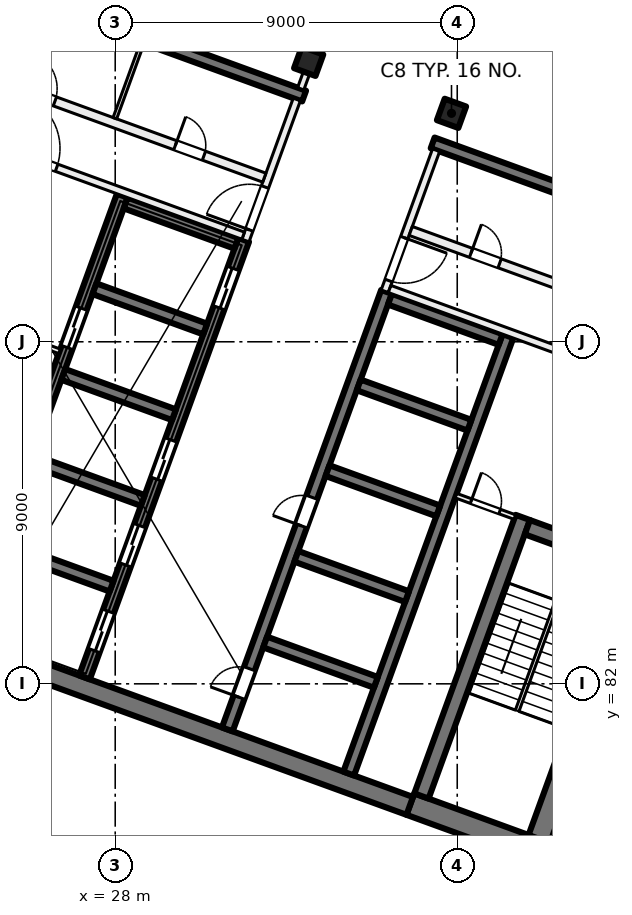
"""IFC4 building model, lengths in metres.
Left out: names, types, materials, properties, quantities, classifications, styles, units other than length and angle.
Written with IfcOpenShell. Run it as: python <this file> out.ifc"""

import sys

from ifc_helpers import new_model, si_unit, direction, frame, frame_2d, origin, origin_2d, place, context, subcontext, project, spatial, rectangle, extrude, element, fill, save


model = new_model("IFC4")
c1 = context("Model", 3, precision=1e-05, world=origin(), true_north=direction((0.0, 1.0)))
c2 = subcontext(c1, "Body", "Model", "MODEL_VIEW")
j1 = project(units=[si_unit("LENGTHUNIT", "METRE"), si_unit("PLANEANGLEUNIT", "RADIAN")], contexts=[c1])
p1 = place(None, origin())
s1 = spatial("IfcSite", under=j1, at=p1, CompositionType="ELEMENT")
p2 = place(p1, origin())
s2 = spatial("IfcBuilding", under=s1, at=p2, CompositionType="ELEMENT")
p3 = place(p2, frame((0.0, 0.0, 204.0)))
s3 = spatial("IfcBuildingStorey", under=s2, at=p3, CompositionType="ELEMENT", Elevation=204.0)
for number, where, z_axis, x_axis in (
    (1, (36.849, 97.011, 0.0), (0.0, 0.0, 1.0), (-0.342, -0.94, 0.0)),
    (2, (33.091, 98.379, 0.0), (0.0, 0.0, 1.0), (-0.342, -0.94, 0.0)),
):
    element("IfcColumn", number, at=place(p3, frame(where, z_axis=z_axis, x_axis=x_axis)), inside=s3, PredefinedType="COLUMN", context=c2, shape_type="SweptSolid", body=[
        extrude(rectangle(XDim=0.6, YDim=0.6, at=origin_2d()), origin(), (0.0, 0.0, 1.0), 4.0),
    ])
p4 = place(p3, frame((39.338, 77.535, 0.0), z_axis=(0.0, 0.0, 1.0), x_axis=(-0.939701471648, 0.341995824804, 0.0)))
e3 = element("IfcWall", 3, at=p4, inside=s3, PredefinedType="SHEAR", context=c2, shape_type="SweptSolid", body=[
    extrude(rectangle(XDim=3.8, YDim=0.6, at=frame_2d((1.9, 0.0))), origin(), (0.0, 0.0, 1.0), 4.0),
])
p5 = place(p3, frame((35.75, 78.788, 0.0), z_axis=(0.0, 0.0, 1.0), x_axis=(-0.939692894512, 0.342019391267, 0.0)))
e4 = element("IfcWall", 4, at=p5, inside=s3, PredefinedType="SHEAR", context=c2, shape_type="SweptSolid", body=[
    extrude(rectangle(XDim=14.4, YDim=0.5, at=frame_2d((7.2, 0.0))), origin(), (0.0, 0.0, 1.0), 4.0),
])
p6 = place(p3, frame((39.159, 77.92, 0.0), z_axis=(0.0, 0.0, 1.0), x_axis=(0.342016982193, 0.939693771338, 0.0)))
e5 = element("IfcWall", 5, at=p6, inside=s3, PredefinedType="SHEAR", context=c2, shape_type="SweptSolid", body=[
    extrude(rectangle(XDim=7.8, YDim=0.6, at=frame_2d((3.9, 0.0))), origin(), (0.0, 0.0, 1.0), 4.0),
])
p7 = place(p3, frame((36.058, 79.048, 0.0), z_axis=(0.0, 0.0, 1.0), x_axis=(0.342016982193, 0.939693771338, 0.0)))
e6 = element("IfcWall", 6, at=p7, inside=s3, PredefinedType="SHEAR", context=c2, shape_type="SweptSolid", body=[
    extrude(rectangle(XDim=7.8, YDim=0.4, at=frame_2d((3.9, 0.0))), origin(), (0.0, 0.0, 1.0), 4.0),
])
p8 = place(p3, frame((41.476, 85.164, 0.0), z_axis=(0.0, 0.0, 1.0), x_axis=(-0.939678810556, 0.342058084236, 0.0)))
e7 = element("IfcWall", 7, at=p8, inside=s3, PredefinedType="SHEAR", context=c2, shape_type="SweptSolid", body=[
    extrude(rectangle(XDim=2.8, YDim=0.4, at=frame_2d((1.4, 0.0))), origin(), (0.0, 0.0, 1.0), 4.0),
])
p9 = place(p8, frame((0.85, 0.0, 0.0)))
e8 = element("IfcOpeningElement", 8, at=p9, cuts=e7, PredefinedType="OPENING", context=c2, shape_type="SweptSolid", body=[
    extrude(rectangle(XDim=1.0, YDim=2.1, at=frame_2d((0.5, 1.05))), frame((0.0, 0.21, 0.0), z_axis=(0.0, -1.0, 0.0), x_axis=(1.0, 0.0, 0.0)), (0.0, 0.0, 1.0), 0.42),
])
p10 = place(p3, frame((30.949, 80.801, 0.0), z_axis=(0.0, 0.0, 1.0), x_axis=(0.342016684409, 0.939693879721, 0.0)))
e9 = element("IfcWall", 9, at=p10, inside=s3, PredefinedType="SHEAR", context=c2, shape_type="SweptSolid", body=[
    extrude(rectangle(XDim=12.25, YDim=0.3, at=frame_2d((6.125, 0.0))), origin(), (0.0, 0.0, 1.0), 4.0),
])
p11 = place(p10, frame((0.9, 0.0, 0.0)))
e10 = element("IfcOpeningElement", 10, at=p11, cuts=e9, PredefinedType="OPENING", context=c2, shape_type="SweptSolid", body=[
    extrude(rectangle(XDim=0.8, YDim=2.1, at=frame_2d((0.4, 1.05))), frame((0.0, 0.16, 0.0), z_axis=(0.0, -1.0, 0.0), x_axis=(1.0, 0.0, 0.0)), (0.0, 0.0, 1.0), 0.32),
])
p12 = place(p10, frame((5.7, 0.0, 0.0)))
e11 = element("IfcOpeningElement", 11, at=p12, cuts=e9, PredefinedType="OPENING", context=c2, shape_type="SweptSolid", body=[
    extrude(rectangle(XDim=0.8, YDim=2.1, at=frame_2d((0.4, 1.05))), frame((0.0, 0.16, 0.0), z_axis=(0.0, -1.0, 0.0), x_axis=(1.0, 0.0, 0.0)), (0.0, 0.0, 1.0), 0.32),
])
p13 = place(p3, frame((34.144, 79.638, 0.0), z_axis=(0.0, 0.0, 1.0), x_axis=(0.342016684409, 0.939693879721, 0.0)))
e12 = element("IfcWall", 12, at=p13, inside=s3, PredefinedType="SHEAR", context=c2, shape_type="SweptSolid", body=[
    extrude(rectangle(XDim=12.25, YDim=0.3, at=frame_2d((6.125, 0.0))), origin(), (0.0, 0.0, 1.0), 4.0),
])
p14 = place(p3, frame((34.858, 82.039, 0.0), z_axis=(0.0, 0.0, 1.0), x_axis=(-0.939689908313, 0.342027595692, 0.0)))
e13 = element("IfcWall", 13, at=p14, inside=s3, PredefinedType="SHEAR", context=c2, shape_type="SweptSolid", body=[
    extrude(rectangle(XDim=3.1, YDim=0.3, at=frame_2d((1.55, 0.0))), origin(), (0.0, 0.0, 1.0), 4.0),
])
p15 = place(p3, frame((35.679, 84.294, 0.0), z_axis=(0.0, 0.0, 1.0), x_axis=(-0.939706007505, 0.341983361377, 0.0)))
e14 = element("IfcWall", 14, at=p15, inside=s3, PredefinedType="SHEAR", context=c2, shape_type="SweptSolid", body=[
    extrude(rectangle(XDim=3.1, YDim=0.3, at=frame_2d((1.55, 0.0))), origin(), (0.0, 0.0, 1.0), 4.0),
])
for number, where, z_axis, x_axis in (
    (15, (36.5, 86.549, 0.0), (0.0, 0.0, 1.0), (-0.94, 0.342, 0.0)),
    (16, (37.321, 88.805, 0.0), (0.0, 0.0, 1.0), (-0.94, 0.342, 0.0)),
    (17, (38.142, 91.06, 0.0), (0.0, 0.0, 1.0), (-0.94, 0.342, 0.0)),
):
    element("IfcWall", number, at=place(p3, frame(where, z_axis=z_axis, x_axis=x_axis)), inside=s3, PredefinedType="SHEAR", context=c2, shape_type="SweptSolid", body=[
        extrude(rectangle(XDim=3.1, YDim=0.3, at=frame_2d((1.55, 0.0))), origin(), (0.0, 0.0, 1.0), 4.0),
    ])
p16 = place(p3, frame((27.191, 82.169, 0.0), z_axis=(0.0, 0.0, 1.0), x_axis=(0.342016684409, 0.939693879721, 0.0)))
e18 = element("IfcWall", 18, at=p16, inside=s3, PredefinedType="SHEAR", context=c2, shape_type="SweptSolid", body=[
    extrude(rectangle(XDim=12.25, YDim=0.3, at=frame_2d((6.125, 0.0))), origin(), (0.0, 0.0, 1.0), 4.0),
])
p17 = place(p16, frame((0.75, 0.0, 0.0)))
e19 = element("IfcOpeningElement", 19, at=p17, cuts=e18, PredefinedType="OPENING", context=c2, shape_type="SweptSolid", body=[
    extrude(rectangle(XDim=1.1, YDim=2.1, at=frame_2d((0.55, 1.05))), frame((0.0, 0.16, 0.0), z_axis=(0.0, -1.0, 0.0), x_axis=(1.0, 0.0, 0.0)), (0.0, 0.0, 1.0), 0.32),
])
p18 = place(p16, frame((3.15, 0.0, 0.0)))
e20 = element("IfcOpeningElement", 20, at=p18, cuts=e18, PredefinedType="OPENING", context=c2, shape_type="SweptSolid", body=[
    extrude(rectangle(XDim=1.1, YDim=2.1, at=frame_2d((0.55, 1.05))), frame((0.0, 0.16, 0.0), z_axis=(0.0, -1.0, 0.0), x_axis=(1.0, 0.0, 0.0)), (0.0, 0.0, 1.0), 0.32),
])
p19 = place(p16, frame((5.55, 0.0, 0.0)))
e21 = element("IfcOpeningElement", 21, at=p19, cuts=e18, PredefinedType="OPENING", context=c2, shape_type="SweptSolid", body=[
    extrude(rectangle(XDim=1.1, YDim=2.1, at=frame_2d((0.55, 1.05))), frame((0.0, 0.16, 0.0), z_axis=(0.0, -1.0, 0.0), x_axis=(1.0, 0.0, 0.0)), (0.0, 0.0, 1.0), 0.32),
])
p20 = place(p16, frame((10.35, 0.0, 0.0)))
e22 = element("IfcOpeningElement", 22, at=p20, cuts=e18, PredefinedType="OPENING", context=c2, shape_type="SweptSolid", body=[
    extrude(rectangle(XDim=1.1, YDim=2.1, at=frame_2d((0.55, 1.05))), frame((0.0, 0.16, 0.0), z_axis=(0.0, -1.0, 0.0), x_axis=(1.0, 0.0, 0.0)), (0.0, 0.0, 1.0), 0.32),
])
p21 = place(p3, frame((23.996, 83.332, 0.0), z_axis=(0.0, 0.0, 1.0), x_axis=(0.342016684409, 0.939693879721, 0.0)))
e23 = element("IfcWall", 23, at=p21, inside=s3, PredefinedType="SHEAR", context=c2, shape_type="SweptSolid", body=[
    extrude(rectangle(XDim=12.25, YDim=0.3, at=frame_2d((6.125, 0.0))), origin(), (0.0, 0.0, 1.0), 4.0),
])
p22 = place(p21, frame((8.0, 0.0, 0.0)))
e24 = element("IfcOpeningElement", 24, at=p22, cuts=e23, PredefinedType="OPENING", context=c2, shape_type="SweptSolid", body=[
    extrude(rectangle(XDim=1.1, YDim=2.1, at=frame_2d((0.55, 1.05))), frame((0.0, 0.16, 0.0), z_axis=(0.0, -1.0, 0.0), x_axis=(1.0, 0.0, 0.0)), (0.0, 0.0, 1.0), 0.32),
])
for number, where, z_axis, x_axis in (
    (25, (27.905, 84.57, 0.0), (0.0, 0.0, 1.0), (-0.94, 0.342, 0.0)),
    (26, (28.726, 86.825, 0.0), (0.0, 0.0, 1.0), (-0.94, 0.342, 0.0)),
    (27, (29.546, 89.08, 0.0), (0.0, 0.0, 1.0), (-0.94, 0.342, 0.0)),
):
    element("IfcWall", number, at=place(p3, frame(where, z_axis=z_axis, x_axis=x_axis)), inside=s3, PredefinedType="SHEAR", context=c2, shape_type="SweptSolid", body=[
        extrude(rectangle(XDim=3.1, YDim=0.3, at=frame_2d((1.55, 0.0))), origin(), (0.0, 0.0, 1.0), 4.0),
    ])
for number, where, z_axis, x_axis in (
    (28, (30.367, 91.336, 0.0), (0.0, 0.0, 1.0), (-0.94, 0.342, 0.0)),
    (29, (31.188, 93.591, 0.0), (0.0, 0.0, 1.0), (-0.94, 0.342, 0.0)),
):
    element("IfcWall", number, at=place(p3, frame(where, z_axis=z_axis, x_axis=x_axis)), inside=s3, PredefinedType="SHEAR", context=c2, shape_type="SweptSolid", body=[
        extrude(rectangle(XDim=3.1, YDim=0.3, at=frame_2d((1.55, 0.0))), origin(), (0.0, 0.0, 1.0), 4.0),
    ])
p23 = place(p3, frame((44.529, 93.258, 0.0), z_axis=(0.0, 0.0, 1.0), x_axis=(-0.9396917844, 0.342022441267, 0.0)))
e30 = element("IfcWall", 30, at=p23, inside=s3, PredefinedType="SHEAR", context=c2, shape_type="SweptSolid", body=[
    extrude(rectangle(XDim=8.7, YDim=0.3, at=frame_2d((4.35, 0.0))), origin(), (0.0, 0.0, 1.0), 4.0),
])
p24 = place(p3, frame((32.971, 97.465, 0.0), z_axis=(0.0, 0.0, 1.0), x_axis=(-0.939695066972, 0.34201342241, 0.0)))
e31 = element("IfcWall", 31, at=p24, inside=s3, PredefinedType="SHEAR", context=c2, shape_type="SweptSolid", body=[
    extrude(rectangle(XDim=8.7, YDim=0.3, at=frame_2d((4.35, 0.0))), origin(), (0.0, 0.0, 1.0), 4.0),
])
p25 = place(p3, frame((31.427, 93.663, 0.0), z_axis=(0.0, 0.0, 1.0), x_axis=(0.342030870568, 0.93968871632, 0.0)))
e32 = element("IfcWall", 32, at=p25, inside=s3, PredefinedType="PARTITIONING", context=c2, shape_type="SweptSolid", body=[
    extrude(rectangle(XDim=3.95, YDim=0.2, at=frame_2d((1.975, 0.0))), origin(), (0.0, 0.0, 1.0), 3.625),
])
p26 = place(p25, frame((0.3, 0.0, 0.0)))
e33 = element("IfcOpeningElement", 33, at=p26, cuts=e32, PredefinedType="OPENING", context=c2, shape_type="SweptSolid", body=[
    extrude(rectangle(XDim=1.2, YDim=2.1, at=frame_2d((0.6, 1.05))), frame((0.0, 0.11, 0.0), z_axis=(0.0, -1.0, 0.0), x_axis=(1.0, 0.0, 0.0)), (0.0, 0.0, 1.0), 0.22),
])
p27 = place(p3, frame((23.427, 96.682, 0.0), z_axis=(0.0, 0.0, 1.0), x_axis=(0.939690465531, -0.342026064782, 0.0)))
e34 = element("IfcWall", 34, at=p27, inside=s3, PredefinedType="PARTITIONING", context=c2, shape_type="SweptSolid", body=[
    extrude(rectangle(XDim=8.45, YDim=0.2, at=frame_2d((4.225, 0.0))), origin(), (0.0, 0.0, 1.0), 3.625),
])
p28 = place(p27, frame((1.725, 0.0, 0.0)))
e35 = element("IfcOpeningElement", 35, at=p28, cuts=e34, PredefinedType="OPENING", context=c2, shape_type="SweptSolid", body=[
    extrude(rectangle(XDim=1.5, YDim=2.1, at=frame_2d((0.75, 1.05))), frame((0.0, 0.11, 0.0), z_axis=(0.0, -1.0, 0.0), x_axis=(1.0, 0.0, 0.0)), (0.0, 0.0, 1.0), 0.22),
])
p29 = place(p3, frame((23.983, 98.208, 0.0), z_axis=(0.0, 0.0, 1.0), x_axis=(0.939699751196, -0.342000552051, 0.0)))
e36 = element("IfcWall", 36, at=p29, inside=s3, PredefinedType="PARTITIONING", context=c2, shape_type="SweptSolid", body=[
    extrude(rectangle(XDim=8.45, YDim=0.25, at=frame_2d((4.225, 0.0))), origin(), (0.0, 0.0, 1.0), 3.625),
])
p30 = place(p29, frame((5.96, 0.0, 0.0)))
e37 = element("IfcOpeningElement", 37, at=p30, cuts=e36, PredefinedType="OPENING", context=c2, shape_type="SweptSolid", body=[
    extrude(rectangle(XDim=0.8, YDim=2.1, at=frame_2d((0.4, 1.05))), frame((0.0, 0.135, 0.0), z_axis=(0.0, -1.0, 0.0), x_axis=(1.0, 0.0, 0.0)), (0.0, 0.0, 1.0), 0.27),
])
p31 = place(p29, frame((1.585, 0.0, 0.0)))
e38 = element("IfcOpeningElement", 38, at=p31, cuts=e36, PredefinedType="OPENING", context=c2, shape_type="SweptSolid", body=[
    extrude(rectangle(XDim=1.0, YDim=2.1, at=frame_2d((0.5, 1.05))), frame((0.0, 0.135, 0.0), z_axis=(0.0, -1.0, 0.0), x_axis=(1.0, 0.0, 0.0)), (0.0, 0.0, 1.0), 0.27),
])
p32 = place(p3, frame((24.985, 91.312, 0.0), z_axis=(0.0, 0.0, 1.0), x_axis=(0.939719959755, -0.341945020783, 0.0)))
e39 = element("IfcWall", 39, at=p32, inside=s3, PredefinedType="PARTITIONING", context=c2, shape_type="SweptSolid", body=[
    extrude(rectangle(XDim=1.65, YDim=0.125, at=frame_2d((0.825, 0.0))), origin(), (0.0, 0.0, 1.0), 3.625),
])
p33 = place(p32, frame((0.425, 0.0, 0.0)))
e40 = element("IfcOpeningElement", 40, at=p33, cuts=e39, PredefinedType="OPENING", context=c2, shape_type="SweptSolid", body=[
    extrude(rectangle(XDim=0.8, YDim=2.1, at=frame_2d((0.4, 1.05))), frame((0.0, 0.073, 0.0), z_axis=(0.0, -1.0, 0.0), x_axis=(1.0, 0.0, 0.0)), (0.0, 0.0, 1.0), 0.145),
])
p34 = place(p3, frame((27.991, 96.883, 0.0), z_axis=(0.0, 0.0, 1.0), x_axis=(0.342023078919, 0.939691552312, 0.0)))
e41 = element("IfcWall", 41, at=p34, inside=s3, PredefinedType="PARTITIONING", context=c2, shape_type="SweptSolid", body=[
    extrude(rectangle(XDim=2.1, YDim=0.1, at=frame_2d((1.05, 0.0))), origin(), (0.0, 0.0, 1.0), 3.625),
])
p35 = place(p3, frame((36.443, 96.041, 0.0), z_axis=(0.0, 0.0, 1.0), x_axis=(-0.341996156931, -0.939701350773, 0.0)))
e42 = element("IfcWall", 42, at=p35, inside=s3, PredefinedType="PARTITIONING", context=c2, shape_type="SweptSolid", body=[
    extrude(rectangle(XDim=3.95, YDim=0.2, at=frame_2d((1.975, 0.0))), origin(), (0.0, 0.0, 1.0), 3.625),
])
p36 = place(p35, frame((2.45, 0.0, 0.0)))
e43 = element("IfcOpeningElement", 43, at=p36, cuts=e42, PredefinedType="OPENING", context=c2, shape_type="SweptSolid", body=[
    extrude(rectangle(XDim=1.2, YDim=2.1, at=frame_2d((0.6, 1.05))), frame((0.0, 0.11, 0.0), z_axis=(0.0, -1.0, 0.0), x_axis=(1.0, 0.0, 0.0)), (0.0, 0.0, 1.0), 0.22),
])
p37 = place(p3, frame((35.22, 92.389, 0.0), z_axis=(0.0, 0.0, 1.0), x_axis=(0.939690465531, -0.342026064782, 0.0)))
e44 = element("IfcWall", 44, at=p37, inside=s3, PredefinedType="PARTITIONING", context=c2, shape_type="SweptSolid", body=[
    extrude(rectangle(XDim=8.45, YDim=0.2, at=frame_2d((4.225, 0.0))), origin(), (0.0, 0.0, 1.0), 3.625),
])
p38 = place(p37, frame((5.225, 0.0, 0.0)))
e45 = element("IfcOpeningElement", 45, at=p38, cuts=e44, PredefinedType="OPENING", context=c2, shape_type="SweptSolid", body=[
    extrude(rectangle(XDim=1.5, YDim=2.1, at=frame_2d((0.75, 1.05))), frame((0.0, 0.11, 0.0), z_axis=(0.0, -1.0, 0.0), x_axis=(1.0, 0.0, 0.0)), (0.0, 0.0, 1.0), 0.22),
])
p39 = place(p3, frame((35.776, 93.916, 0.0), z_axis=(0.0, 0.0, 1.0), x_axis=(0.939690465531, -0.342026064782, 0.0)))
e46 = element("IfcWall", 46, at=p39, inside=s3, PredefinedType="PARTITIONING", context=c2, shape_type="SweptSolid", body=[
    extrude(rectangle(XDim=8.45, YDim=0.25, at=frame_2d((4.225, 0.0))), origin(), (0.0, 0.0, 1.0), 3.625),
])
p40 = place(p39, frame((1.69, 0.0, 0.0)))
e47 = element("IfcOpeningElement", 47, at=p40, cuts=e46, PredefinedType="OPENING", context=c2, shape_type="SweptSolid", body=[
    extrude(rectangle(XDim=0.8, YDim=2.1, at=frame_2d((0.4, 1.05))), frame((0.0, 0.135, 0.0), z_axis=(0.0, -1.0, 0.0), x_axis=(1.0, 0.0, 0.0)), (0.0, 0.0, 1.0), 0.27),
])
p41 = place(p39, frame((5.965, 0.0, 0.0)))
e48 = element("IfcOpeningElement", 48, at=p41, cuts=e46, PredefinedType="OPENING", context=c2, shape_type="SweptSolid", body=[
    extrude(rectangle(XDim=0.8, YDim=2.1, at=frame_2d((0.4, 1.05))), frame((0.0, 0.135, 0.0), z_axis=(0.0, -1.0, 0.0), x_axis=(1.0, 0.0, 0.0)), (0.0, 0.0, 1.0), 0.27),
])
p42 = place(p3, frame((36.966, 86.952, 0.0), z_axis=(0.0, 0.0, 1.0), x_axis=(0.939672407396, -0.342075674051, 0.0)))
e49 = element("IfcWall", 49, at=p42, inside=s3, PredefinedType="PARTITIONING", context=c2, shape_type="SweptSolid", body=[
    extrude(rectangle(XDim=1.65, YDim=0.125, at=frame_2d((0.825, 0.0))), origin(), (0.0, 0.0, 1.0), 3.625),
])
p43 = place(p42, frame((0.425, 0.0, 0.0)))
e50 = element("IfcOpeningElement", 50, at=p43, cuts=e49, PredefinedType="OPENING", context=c2, shape_type="SweptSolid", body=[
    extrude(rectangle(XDim=0.8, YDim=2.1, at=frame_2d((0.4, 1.05))), frame((0.0, 0.073, 0.0), z_axis=(0.0, -1.0, 0.0), x_axis=(1.0, 0.0, 0.0)), (0.0, 0.0, 1.0), 0.145),
])
p44 = place(p3, frame((32.881, 97.657, 0.0), z_axis=(0.0, 0.0, 1.0), x_axis=(0.342058204353, 0.939678766832, 0.0)))
e51 = element("IfcWall", 51, at=p44, inside=s3, PredefinedType="PARTITIONING", context=c2, shape_type="SweptSolid", body=[
    extrude(rectangle(XDim=5.163, YDim=0.175, at=frame_2d((2.581, 0.0))), origin(), (0.0, 0.0, 1.0), 3.625),
])
p45 = place(p44, frame((1.991, 0.0, 0.0)))
e52 = element("IfcOpeningElement", 52, at=p45, cuts=e51, PredefinedType="OPENING", context=c2, shape_type="SweptSolid", body=[
    extrude(rectangle(XDim=1.2, YDim=2.1, at=frame_2d((0.6, 1.05))), frame((0.0, 0.097, 0.0), z_axis=(0.0, -1.0, 0.0), x_axis=(1.0, 0.0, 0.0)), (0.0, 0.0, 1.0), 0.195),
])
p46 = place(p17, origin())
e53 = element("IfcDoor", 53, at=p46, inside=s3, OperationType="DOUBLE_DOOR_SLIDING", PredefinedType="DOOR", context=c2, shape_type="SweptSolid", body=[
    extrude(rectangle(XDim=1.1, YDim=2.1, at=frame_2d((0.55, 1.05))), frame((0.0, 0.025, 0.0), z_axis=(0.0, -1.0, 0.0), x_axis=(1.0, 0.0, 0.0)), (0.0, 0.0, 1.0), 0.05),
])
fill(e19, e53)
p47 = place(p18, origin())
e54 = element("IfcDoor", 54, at=p47, inside=s3, OperationType="DOUBLE_DOOR_SLIDING", PredefinedType="DOOR", context=c2, shape_type="SweptSolid", body=[
    extrude(rectangle(XDim=1.1, YDim=2.1, at=frame_2d((0.55, 1.05))), frame((0.0, 0.025, 0.0), z_axis=(0.0, -1.0, 0.0), x_axis=(1.0, 0.0, 0.0)), (0.0, 0.0, 1.0), 0.05),
])
fill(e20, e54)
p48 = place(p19, origin())
e55 = element("IfcDoor", 55, at=p48, inside=s3, OperationType="DOUBLE_DOOR_SLIDING", PredefinedType="DOOR", context=c2, shape_type="SweptSolid", body=[
    extrude(rectangle(XDim=1.1, YDim=2.1, at=frame_2d((0.55, 1.05))), frame((0.0, 0.025, 0.0), z_axis=(0.0, -1.0, 0.0), x_axis=(1.0, 0.0, 0.0)), (0.0, 0.0, 1.0), 0.05),
])
fill(e21, e55)
p49 = place(p20, origin())
e56 = element("IfcDoor", 56, at=p49, inside=s3, OperationType="DOUBLE_DOOR_SLIDING", PredefinedType="DOOR", context=c2, shape_type="SweptSolid", body=[
    extrude(rectangle(XDim=1.1, YDim=2.1, at=frame_2d((0.55, 1.05))), frame((0.0, 0.025, 0.0), z_axis=(0.0, -1.0, 0.0), x_axis=(1.0, 0.0, 0.0)), (0.0, 0.0, 1.0), 0.05),
])
fill(e22, e56)
p50 = place(p11, origin())
e57 = element("IfcDoor", 57, at=p50, inside=s3, OperationType="SINGLE_SWING_LEFT", PredefinedType="DOOR", context=c2, shape_type="SweptSolid", body=[
    extrude(rectangle(XDim=0.8, YDim=2.1, at=frame_2d((0.4, 1.05))), frame((0.0, 0.025, 0.0), z_axis=(0.0, -1.0, 0.0), x_axis=(1.0, 0.0, 0.0)), (0.0, 0.0, 1.0), 0.05),
])
fill(e10, e57)
p51 = place(p12, origin())
e58 = element("IfcDoor", 58, at=p51, inside=s3, OperationType="SINGLE_SWING_RIGHT", PredefinedType="DOOR", context=c2, shape_type="SweptSolid", body=[
    extrude(rectangle(XDim=0.8, YDim=2.1, at=frame_2d((0.4, 1.05))), frame((0.0, 0.025, 0.0), z_axis=(0.0, -1.0, 0.0), x_axis=(1.0, 0.0, 0.0)), (0.0, 0.0, 1.0), 0.05),
])
fill(e11, e58)
p52 = place(p26, origin())
e59 = element("IfcDoor", 59, at=p52, inside=s3, OperationType="DOUBLE_DOOR_SINGLE_SWING", PredefinedType="DOOR", context=c2, shape_type="SweptSolid", body=[
    extrude(rectangle(XDim=1.2, YDim=2.1, at=frame_2d((0.6, 1.05))), frame((0.0, 0.025, 0.0), z_axis=(0.0, -1.0, 0.0), x_axis=(1.0, 0.0, 0.0)), (0.0, 0.0, 1.0), 0.05),
])
fill(e33, e59)
p53 = place(p28, origin())
e60 = element("IfcDoor", 60, at=p53, inside=s3, OperationType="DOUBLE_DOOR_SINGLE_SWING", PredefinedType="DOOR", context=c2, shape_type="SweptSolid", body=[
    extrude(rectangle(XDim=1.5, YDim=2.1, at=frame_2d((0.75, 1.05))), frame((0.0, 0.025, 0.0), z_axis=(0.0, -1.0, 0.0), x_axis=(1.0, 0.0, 0.0)), (0.0, 0.0, 1.0), 0.05),
])
fill(e35, e60)
p54 = place(p30, origin())
e61 = element("IfcDoor", 61, at=p54, inside=s3, OperationType="SINGLE_SWING_LEFT", PredefinedType="DOOR", context=c2, shape_type="SweptSolid", body=[
    extrude(rectangle(XDim=0.8, YDim=2.1, at=frame_2d((0.4, 1.05))), frame((0.0, 0.025, 0.0), z_axis=(0.0, -1.0, 0.0), x_axis=(1.0, 0.0, 0.0)), (0.0, 0.0, 1.0), 0.05),
])
fill(e37, e61)
p55 = place(p31, origin())
e62 = element("IfcDoor", 62, at=p55, inside=s3, OperationType="SINGLE_SWING_RIGHT", PredefinedType="DOOR", context=c2, shape_type="SweptSolid", body=[
    extrude(rectangle(XDim=1.0, YDim=2.1, at=frame_2d((0.5, 1.05))), frame((0.0, 0.025, 0.0), z_axis=(0.0, -1.0, 0.0), x_axis=(1.0, 0.0, 0.0)), (0.0, 0.0, 1.0), 0.05),
])
fill(e38, e62)
p56 = place(p36, origin())
e63 = element("IfcDoor", 63, at=p56, inside=s3, OperationType="DOUBLE_DOOR_SINGLE_SWING", PredefinedType="DOOR", context=c2, shape_type="SweptSolid", body=[
    extrude(rectangle(XDim=1.2, YDim=2.1, at=frame_2d((0.6, 1.05))), frame((0.0, 0.025, 0.0), z_axis=(0.0, -1.0, 0.0), x_axis=(1.0, 0.0, 0.0)), (0.0, 0.0, 1.0), 0.05),
])
fill(e43, e63)
p57 = place(p43, origin())
e64 = element("IfcDoor", 64, at=p57, inside=s3, OperationType="SINGLE_SWING_LEFT", PredefinedType="DOOR", context=c2, shape_type="SweptSolid", body=[
    extrude(rectangle(XDim=0.8, YDim=2.1, at=frame_2d((0.4, 1.05))), frame((0.0, 0.025, 0.0), z_axis=(0.0, -1.0, 0.0), x_axis=(1.0, 0.0, 0.0)), (0.0, 0.0, 1.0), 0.05),
])
fill(e50, e64)
p58 = place(p40, origin())
e65 = element("IfcDoor", 65, at=p58, inside=s3, OperationType="SINGLE_SWING_RIGHT", PredefinedType="DOOR", context=c2, shape_type="SweptSolid", body=[
    extrude(rectangle(XDim=0.8, YDim=2.1, at=frame_2d((0.4, 1.05))), frame((0.0, 0.025, 0.0), z_axis=(0.0, -1.0, 0.0), x_axis=(1.0, 0.0, 0.0)), (0.0, 0.0, 1.0), 0.05),
])
fill(e47, e65)
p59 = place(p22, origin())
e66 = element("IfcDoor", 66, at=p59, inside=s3, OperationType="DOUBLE_DOOR_SLIDING", PredefinedType="DOOR", context=c2, shape_type="SweptSolid", body=[
    extrude(rectangle(XDim=1.1, YDim=2.1, at=frame_2d((0.55, 1.05))), frame((0.0, 0.025, 0.0), z_axis=(0.0, -1.0, 0.0), x_axis=(1.0, 0.0, 0.0)), (0.0, 0.0, 1.0), 0.05),
])
fill(e24, e66)
save(model, sys.argv[1])
